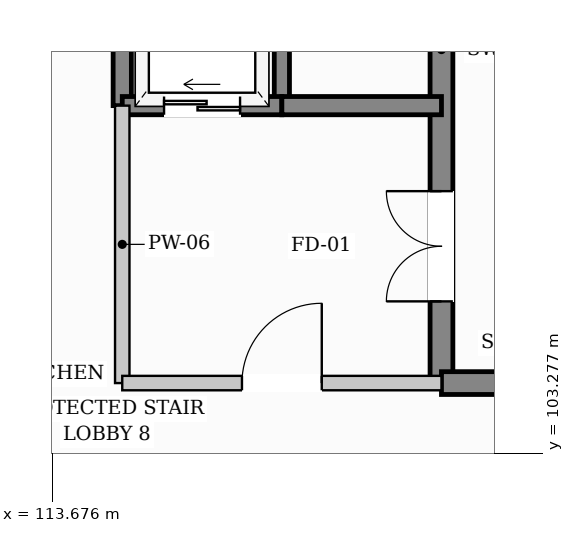
"""IFC4 building model, lengths in metres.
Left out: names, types, materials, properties, quantities, classifications, styles, units other than length and angle.
Written with IfcOpenShell. Run it as: python <this file> out.ifc"""

import sys

from ifc_helpers import new_model, si_unit, direction, frame, frame_2d, origin, place, context, subcontext, project, spatial, rectangle, extrude, element, fill, save


model = new_model("IFC4")
c1 = context("Model", 3, precision=1e-05, world=origin(), true_north=direction((0.0, 1.0)))
c2 = subcontext(c1, "Body", "Model", "MODEL_VIEW")
j1 = project(units=[si_unit("LENGTHUNIT", "METRE"), si_unit("PLANEANGLEUNIT", "RADIAN")], contexts=[c1])
p1 = place(None, origin())
s1 = spatial("IfcSite", under=j1, at=p1, CompositionType="ELEMENT")
p2 = place(p1, origin())
s2 = spatial("IfcBuilding", under=s1, at=p2, CompositionType="ELEMENT")
p3 = place(p2, origin())
s3 = spatial("IfcBuildingStorey", under=s2, at=p3, CompositionType="ELEMENT", Elevation=0.0)
p4 = place(p3, frame((118.8, 104.2, 0.0), z_axis=(0.0, 0.0, 1.0), x_axis=(0.0, 1.0, 0.0)))
e1 = element("IfcWall", 1, at=p4, inside=s3, PredefinedType="SHEAR", context=c2, shape_type="SweptSolid", body=[
    extrude(rectangle(XDim=6.0, YDim=0.3, at=frame_2d((3.0, 0.0))), origin(), (0.0, 0.0, 1.0), 4.78),
])
p5 = place(p4, frame((1.075, 0.0, 0.0)))
e2 = element("IfcOpeningElement", 2, at=p5, cuts=e1, PredefinedType="OPENING", context=c2, shape_type="SweptSolid", body=[
    extrude(rectangle(XDim=1.45, YDim=2.2, at=frame_2d((0.725, 1.1))), frame((0.0, 0.16, 0.0), z_axis=(0.0, -1.0, 0.0), x_axis=(1.0, 0.0, 0.0)), (0.0, 0.0, 1.0), 0.32),
])
p6 = place(p3, frame((118.8, 104.2, 0.0), z_axis=(0.0, 0.0, 1.0), x_axis=(1.0, 0.0, 0.0)))
e3 = element("IfcWall", 3, at=p6, inside=s3, PredefinedType="SHEAR", context=c2, shape_type="SweptSolid", body=[
    extrude(rectangle(XDim=7.0, YDim=0.3, at=frame_2d((3.5, 0.0))), origin(), (0.0, 0.0, 1.0), 4.78),
])
p7 = place(p3, frame((114.6, 107.85, 0.0), z_axis=(0.0, 0.0, 1.0), x_axis=(0.0, 1.0, 0.0)))
e4 = element("IfcWall", 4, at=p7, inside=s3, PredefinedType="SHEAR", context=c2, shape_type="SweptSolid", body=[
    extrude(rectangle(XDim=2.35, YDim=0.24, at=frame_2d((1.175, 0.0))), origin(), (0.0, 0.0, 1.0), 4.78),
])
p8 = place(p3, frame((116.7, 107.85, 0.0), z_axis=(0.0, 0.0, 1.0), x_axis=(0.0, 1.0, 0.0)))
e5 = element("IfcWall", 5, at=p8, inside=s3, PredefinedType="SHEAR", context=c2, shape_type="SweptSolid", body=[
    extrude(rectangle(XDim=2.35, YDim=0.2, at=frame_2d((1.175, 0.0))), origin(), (0.0, 0.0, 1.0), 4.78),
])
p9 = place(p3, frame((114.6, 107.85, 0.0), z_axis=(0.0, 0.0, 1.0), x_axis=(1.0, 0.0, 0.0)))
e6 = element("IfcWall", 6, at=p9, inside=s3, PredefinedType="SHEAR", context=c2, shape_type="SweptSolid", body=[
    extrude(rectangle(XDim=2.1, YDim=0.24, at=frame_2d((1.05, 0.0))), origin(), (0.0, 0.0, 1.0), 4.78),
])
p10 = place(p9, frame((0.55, 0.0, 0.0)))
e7 = element("IfcOpeningElement", 7, at=p10, cuts=e6, PredefinedType="OPENING", context=c2, shape_type="SweptSolid", body=[
    extrude(rectangle(XDim=1.0, YDim=2.1, at=frame_2d((0.5, 1.05))), frame((0.0, 0.13, 0.0), z_axis=(0.0, -1.0, 0.0), x_axis=(1.0, 0.0, 0.0)), (0.0, 0.0, 1.0), 0.26),
])
p11 = place(p3, frame((116.7, 107.85, 0.0), z_axis=(0.0, 0.0, 1.0), x_axis=(1.0, 0.0, 0.0)))
e8 = element("IfcWall", 8, at=p11, inside=s3, PredefinedType="SHEAR", context=c2, shape_type="SweptSolid", body=[
    extrude(rectangle(XDim=2.1, YDim=0.24, at=frame_2d((1.05, 0.0))), origin(), (0.0, 0.0, 1.0), 4.78),
])
p12 = place(p3, frame((114.6, 104.2, 0.0), z_axis=(0.0, 0.0, 1.0), x_axis=(0.0, 1.0, 0.0)))
e9 = element("IfcWall", 9, at=p12, inside=s3, PredefinedType="PARTITIONING", context=c2, shape_type="SweptSolid", body=[
    extrude(rectangle(XDim=3.65, YDim=0.19, at=frame_2d((1.825, 0.0))), origin(), (0.0, 0.0, 1.0), 4.78),
])
p13 = place(p3, frame((114.6, 104.2, 0.0), z_axis=(0.0, 0.0, 1.0), x_axis=(1.0, 0.0, 0.0)))
e10 = element("IfcWall", 10, at=p13, inside=s3, PredefinedType="PARTITIONING", context=c2, shape_type="SweptSolid", body=[
    extrude(rectangle(XDim=4.2, YDim=0.19, at=frame_2d((2.1, 0.0))), origin(), (0.0, 0.0, 1.0), 4.78),
])
p14 = place(p13, frame((1.575, 0.0, 0.0)))
e11 = element("IfcOpeningElement", 11, at=p14, cuts=e10, PredefinedType="OPENING", context=c2, shape_type="SweptSolid", body=[
    extrude(rectangle(XDim=1.05, YDim=2.15, at=frame_2d((0.525, 1.075))), frame((0.0, 0.105, 0.0), z_axis=(0.0, -1.0, 0.0), x_axis=(1.0, 0.0, 0.0)), (0.0, 0.0, 1.0), 0.21),
])
p15 = place(p5, origin())
e12 = element("IfcDoor", 12, at=p15, inside=s3, OperationType="DOUBLE_DOOR_SINGLE_SWING", PredefinedType="DOOR", context=c2, shape_type="SweptSolid", body=[
    extrude(rectangle(XDim=1.45, YDim=2.2, at=frame_2d((0.725, 1.1))), frame((0.0, 0.025, 0.0), z_axis=(0.0, -1.0, 0.0), x_axis=(1.0, 0.0, 0.0)), (0.0, 0.0, 1.0), 0.05),
])
fill(e2, e12)
p16 = place(p10, origin())
e13 = element("IfcDoor", 13, at=p16, inside=s3, OperationType="SLIDING_TO_LEFT", PredefinedType="DOOR", context=c2, shape_type="SweptSolid", body=[
    extrude(rectangle(XDim=1.0, YDim=2.1, at=frame_2d((0.5, 1.05))), frame((0.0, 0.025, 0.0), z_axis=(0.0, -1.0, 0.0), x_axis=(1.0, 0.0, 0.0)), (0.0, 0.0, 1.0), 0.05),
])
fill(e7, e13)
p17 = place(p14, origin())
e14 = element("IfcDoor", 14, at=p17, inside=s3, OperationType="SINGLE_SWING_RIGHT", PredefinedType="DOOR", context=c2, shape_type="SweptSolid", body=[
    extrude(rectangle(XDim=1.05, YDim=2.15, at=frame_2d((0.525, 1.075))), frame((0.0, 0.025, 0.0), z_axis=(0.0, -1.0, 0.0), x_axis=(1.0, 0.0, 0.0)), (0.0, 0.0, 1.0), 0.05),
])
fill(e11, e14)
save(model, sys.argv[1])
